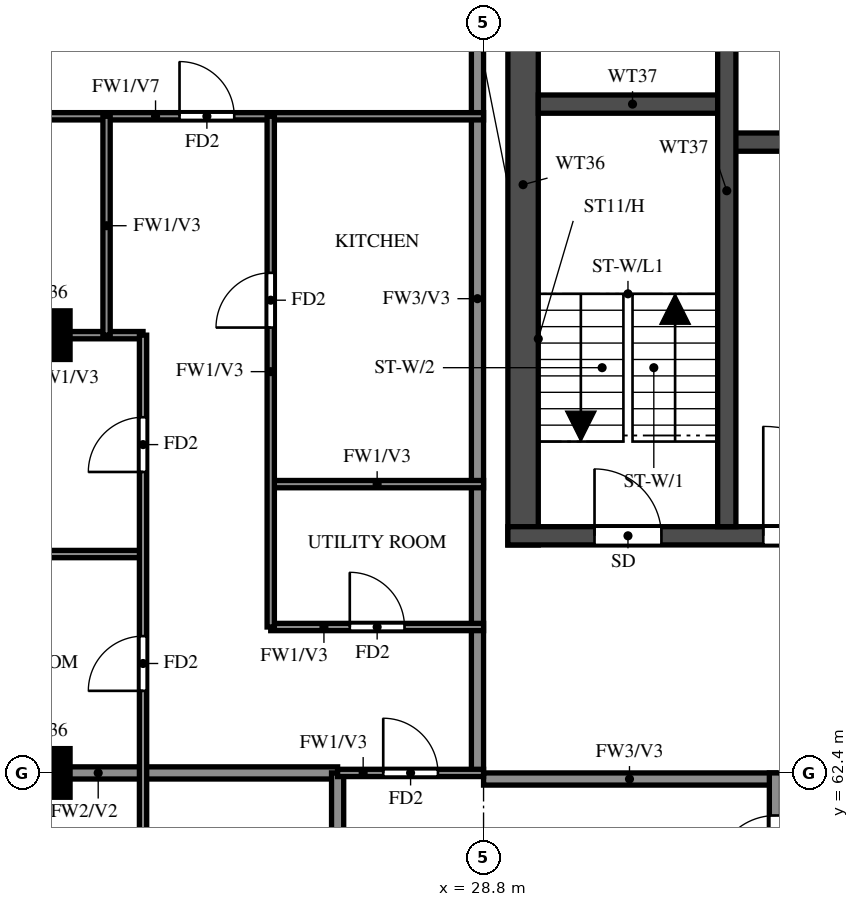
"""IFC4 building model, lengths in metres.
Left out: names, types, materials, properties, quantities, classifications, styles, units other than length and angle.
Written with IfcOpenShell. Run it as: python <this file> out.ifc"""

import sys

from ifc_helpers import new_model, si_unit, direction, frame, frame_2d, origin, origin_2d, place, context, subcontext, project, spatial, rectangle, extrude, source, transform, mapped, element, fill, save


model = new_model("IFC4")
c1 = context("Model", 3, precision=1e-05, world=origin(), true_north=direction((0.0, 1.0)))
c2 = subcontext(c1, "Body", "Model", "MODEL_VIEW")
j1 = project(units=[si_unit("LENGTHUNIT", "METRE"), si_unit("PLANEANGLEUNIT", "RADIAN")], contexts=[c1])
p1 = place(None, origin())
s1 = spatial("IfcSite", under=j1, at=p1, CompositionType="ELEMENT")
p2 = place(p1, origin())
s2 = spatial("IfcBuilding", under=s1, at=p2, CompositionType="ELEMENT")
p3 = place(p2, frame((0.0, 0.0, 250.0)))
s3 = spatial("IfcBuildingStorey", under=s2, at=p3, CompositionType="ELEMENT", Elevation=250.0)
m1 = source(origin(), c2, "Body", "SweptSolid", [
    extrude(rectangle(XDim=0.8, YDim=0.8, at=origin_2d()), origin(), (0.0, 0.0, 1.0), 3.22),
])
for number, where, z_axis, x_axis in (
    (1, (21.6, 62.4, 0.0), (0.0, 0.0, 1.0), (1.0, 0.0, 0.0)),
    (2, (21.6, 69.6, 0.0), (0.0, 0.0, 1.0), (1.0, 0.0, 0.0)),
):
    element("IfcColumn", number, at=place(p3, frame(where, z_axis=z_axis, x_axis=x_axis)), inside=s3, PredefinedType="COLUMN", context=c2, shape_type="MappedRepresentation", body=[
        mapped(m1, transform((0.0, 0.0, 0.0))),
    ])
p4 = place(p3, frame((29.45, 66.15, 0.0), z_axis=(0.0, 0.0, 1.0), x_axis=(0.0, 1.0, 0.0)))
e3 = element("IfcWall", 3, at=p4, inside=s3, PredefinedType="SHEAR", context=c2, shape_type="SweptSolid", body=[
    extrude(rectangle(XDim=11.85, YDim=0.5, at=frame_2d((5.925, 0.0))), origin(), (0.0, 0.0, 1.0), 3.22),
])
p5 = place(p3, frame((29.2, 66.3, 0.0), z_axis=(0.0, 0.0, 1.0), x_axis=(1.0, 0.0, 0.0)))
e4 = element("IfcWall", 4, at=p5, inside=s3, PredefinedType="SHEAR", context=c2, shape_type="SweptSolid", body=[
    extrude(rectangle(XDim=42.4, YDim=0.3, at=frame_2d((21.2, 0.0))), origin(), (0.0, 0.0, 1.0), 3.22),
])
p6 = place(p5, frame((1.425, 0.0, 0.0)))
e5 = element("IfcOpeningElement", 5, at=p6, cuts=e4, PredefinedType="OPENING", context=c2, shape_type="SweptSolid", body=[
    extrude(rectangle(XDim=1.1, YDim=2.1, at=frame_2d((0.55, 1.05))), frame((0.0, 0.16, 0.0), z_axis=(0.0, -1.0, 0.0), x_axis=(1.0, 0.0, 0.0)), (0.0, 0.0, 1.0), 0.32),
])
p7 = place(p5, frame((4.2, 0.0, 0.0)))
e6 = element("IfcOpeningElement", 6, at=p7, cuts=e4, PredefinedType="OPENING", context=c2, shape_type="SweptSolid", body=[
    extrude(rectangle(XDim=1.8, YDim=2.1, at=frame_2d((0.9, 1.05))), frame((0.0, 0.16, 0.0), z_axis=(0.0, -1.0, 0.0), x_axis=(1.0, 0.0, 0.0)), (0.0, 0.0, 1.0), 0.32),
])
p8 = place(p3, frame((32.8, 72.775, 0.0), z_axis=(0.0, 0.0, 1.0), x_axis=(1.0, 0.0, 0.0)))
e7 = element("IfcWall", 7, at=p8, inside=s3, PredefinedType="SHEAR", context=c2, shape_type="SweptSolid", body=[
    extrude(rectangle(XDim=35.2, YDim=0.3, at=frame_2d((17.6, 0.0))), origin(), (0.0, 0.0, 1.0), 3.22),
])
p9 = place(p8, frame((19.8, 0.0, 0.0)))
e8 = element("IfcOpeningElement", 8, at=p9, cuts=e7, PredefinedType="OPENING", context=c2, shape_type="SweptSolid", body=[
    extrude(rectangle(XDim=1.1, YDim=2.1, at=frame_2d((0.55, 1.05))), frame((0.0, 0.16, 0.0), z_axis=(0.0, -1.0, 0.0), x_axis=(1.0, 0.0, 0.0)), (0.0, 0.0, 1.0), 0.32),
])
p10 = place(p8, frame((27.725, 0.0, 0.0)))
e9 = element("IfcOpeningElement", 9, at=p10, cuts=e7, PredefinedType="OPENING", context=c2, shape_type="SweptSolid", body=[
    extrude(rectangle(XDim=1.1, YDim=2.1, at=frame_2d((0.55, 1.05))), frame((0.0, 0.16, 0.0), z_axis=(0.0, -1.0, 0.0), x_axis=(1.0, 0.0, 0.0)), (0.0, 0.0, 1.0), 0.32),
])
p11 = place(p8, frame((30.325, 0.0, 0.0)))
e10 = element("IfcOpeningElement", 10, at=p11, cuts=e7, PredefinedType="OPENING", context=c2, shape_type="SweptSolid", body=[
    extrude(rectangle(XDim=1.1, YDim=2.1, at=frame_2d((0.55, 1.05))), frame((0.0, 0.16, 0.0), z_axis=(0.0, -1.0, 0.0), x_axis=(1.0, 0.0, 0.0)), (0.0, 0.0, 1.0), 0.32),
])
p12 = place(p8, frame((3.825, 0.0, 0.0)))
e11 = element("IfcOpeningElement", 11, at=p12, cuts=e7, PredefinedType="OPENING", context=c2, shape_type="SweptSolid", body=[
    extrude(rectangle(XDim=1.1, YDim=2.1, at=frame_2d((0.55, 1.05))), frame((0.0, 0.16, 0.0), z_axis=(0.0, -1.0, 0.0), x_axis=(1.0, 0.0, 0.0)), (0.0, 0.0, 1.0), 0.32),
])
p13 = place(p8, frame((6.575, 0.0, 0.0)))
e12 = element("IfcOpeningElement", 12, at=p13, cuts=e7, PredefinedType="OPENING", context=c2, shape_type="SweptSolid", body=[
    extrude(rectangle(XDim=1.1, YDim=2.1, at=frame_2d((0.55, 1.05))), frame((0.0, 0.16, 0.0), z_axis=(0.0, -1.0, 0.0), x_axis=(1.0, 0.0, 0.0)), (0.0, 0.0, 1.0), 0.32),
])
p14 = place(p8, frame((9.325, 0.0, 0.0)))
e13 = element("IfcOpeningElement", 13, at=p14, cuts=e7, PredefinedType="OPENING", context=c2, shape_type="SweptSolid", body=[
    extrude(rectangle(XDim=1.1, YDim=2.1, at=frame_2d((0.55, 1.05))), frame((0.0, 0.16, 0.0), z_axis=(0.0, -1.0, 0.0), x_axis=(1.0, 0.0, 0.0)), (0.0, 0.0, 1.0), 0.32),
])
p15 = place(p8, frame((12.075, 0.0, 0.0)))
e14 = element("IfcOpeningElement", 14, at=p15, cuts=e7, PredefinedType="OPENING", context=c2, shape_type="SweptSolid", body=[
    extrude(rectangle(XDim=1.1, YDim=2.1, at=frame_2d((0.55, 1.05))), frame((0.0, 0.16, 0.0), z_axis=(0.0, -1.0, 0.0), x_axis=(1.0, 0.0, 0.0)), (0.0, 0.0, 1.0), 0.32),
])
p16 = place(p8, frame((14.825, 0.0, 0.0)))
e15 = element("IfcOpeningElement", 15, at=p16, cuts=e7, PredefinedType="OPENING", context=c2, shape_type="SweptSolid", body=[
    extrude(rectangle(XDim=1.1, YDim=2.1, at=frame_2d((0.55, 1.05))), frame((0.0, 0.16, 0.0), z_axis=(0.0, -1.0, 0.0), x_axis=(1.0, 0.0, 0.0)), (0.0, 0.0, 1.0), 0.32),
])
p17 = place(p8, frame((17.575, 0.0, 0.0)))
e16 = element("IfcOpeningElement", 16, at=p17, cuts=e7, PredefinedType="OPENING", context=c2, shape_type="SweptSolid", body=[
    extrude(rectangle(XDim=1.1, YDim=2.1, at=frame_2d((0.55, 1.05))), frame((0.0, 0.16, 0.0), z_axis=(0.0, -1.0, 0.0), x_axis=(1.0, 0.0, 0.0)), (0.0, 0.0, 1.0), 0.32),
])
p18 = place(p8, frame((0.95, 0.0, 0.0)))
e17 = element("IfcOpeningElement", 17, at=p18, cuts=e7, PredefinedType="OPENING", context=c2, shape_type="SweptSolid", body=[
    extrude(rectangle(XDim=1.1, YDim=2.1, at=frame_2d((0.55, 1.05))), frame((0.0, 0.16, 0.0), z_axis=(0.0, -1.0, 0.0), x_axis=(1.0, 0.0, 0.0)), (0.0, 0.0, 1.0), 0.32),
])
p19 = place(p3, frame((29.7, 73.4, 0.0), z_axis=(0.0, 0.0, 1.0), x_axis=(1.0, 0.0, 0.0)))
e18 = element("IfcWall", 18, at=p19, inside=s3, PredefinedType="SHEAR", context=c2, shape_type="SweptSolid", body=[
    extrude(rectangle(XDim=3.1, YDim=0.3, at=frame_2d((1.55, 0.0))), origin(), (0.0, 0.0, 1.0), 3.22),
])
p20 = place(p3, frame((32.8, 66.45, 0.0), z_axis=(0.0, 0.0, 1.0), x_axis=(0.0, 1.0, 0.0)))
e19 = element("IfcWall", 19, at=p20, inside=s3, PredefinedType="SHEAR", context=c2, shape_type="SweptSolid", body=[
    extrude(rectangle(XDim=11.05, YDim=0.3, at=frame_2d((5.525, 0.0))), origin(), (0.0, 0.0, 1.0), 3.22),
])
p21 = place(p3, frame((28.8, 62.3, 0.0), z_axis=(0.0, 0.0, 1.0), x_axis=(1.0, 0.0, 0.0)))
e20 = element("IfcWall", 20, at=p21, inside=s3, PredefinedType="SOLIDWALL", context=c2, shape_type="SweptSolid", body=[
    extrude(rectangle(XDim=4.8, YDim=0.2, at=frame_2d((2.4, 0.0))), origin(), (0.0, 0.0, 1.0), 3.22),
])
p22 = place(p3, frame((28.7, 62.4, 0.0), z_axis=(0.0, 0.0, 1.0), x_axis=(0.0, 1.0, 0.0)))
e21 = element("IfcWall", 21, at=p22, inside=s3, PredefinedType="SOLIDWALL", context=c2, shape_type="SweptSolid", body=[
    extrude(rectangle(XDim=15.6, YDim=0.2, at=frame_2d((7.8, 0.0))), origin(), (0.0, 0.0, 1.0), 3.22),
])
p23 = place(p3, frame((33.6, 45.6, 0.0), z_axis=(0.0, 0.0, 1.0), x_axis=(0.0, 1.0, 0.0)))
e22 = element("IfcWall", 22, at=p23, inside=s3, PredefinedType="SOLIDWALL", context=c2, shape_type="SweptSolid", body=[
    extrude(rectangle(XDim=16.8, YDim=0.2, at=frame_2d((8.4, 0.0))), origin(), (0.0, 0.0, 1.0), 3.22),
])
p24 = place(p23, frame((0.7, 0.0, 0.0)))
e23 = element("IfcOpeningElement", 23, at=p24, cuts=e22, PredefinedType="OPENING", context=c2, shape_type="SweptSolid", body=[
    extrude(rectangle(XDim=1.0, YDim=2.1, at=frame_2d((0.5, 1.05))), frame((0.0, 0.11, 0.0), z_axis=(0.0, -1.0, 0.0), x_axis=(1.0, 0.0, 0.0)), (0.0, 0.0, 1.0), 0.22),
])
p25 = place(p23, frame((8.3, 0.0, 0.0)))
e24 = element("IfcOpeningElement", 24, at=p25, cuts=e22, PredefinedType="OPENING", context=c2, shape_type="SweptSolid", body=[
    extrude(rectangle(XDim=1.0, YDim=2.1, at=frame_2d((0.5, 1.05))), frame((0.0, 0.11, 0.0), z_axis=(0.0, -1.0, 0.0), x_axis=(1.0, 0.0, 0.0)), (0.0, 0.0, 1.0), 0.22),
])
p26 = place(p23, frame((15.1, 0.0, 0.0)))
e25 = element("IfcOpeningElement", 25, at=p26, cuts=e22, PredefinedType="OPENING", context=c2, shape_type="SweptSolid", body=[
    extrude(rectangle(XDim=1.0, YDim=2.1, at=frame_2d((0.5, 1.05))), frame((0.0, 0.11, 0.0), z_axis=(0.0, -1.0, 0.0), x_axis=(1.0, 0.0, 0.0)), (0.0, 0.0, 1.0), 0.22),
])
p27 = place(p3, frame((18.525, 62.4, 0.0), z_axis=(0.0, 0.0, 1.0), x_axis=(1.0, 0.0, 0.0)))
e26 = element("IfcWall", 26, at=p27, inside=s3, PredefinedType="SOLIDWALL", context=c2, shape_type="SweptSolid", body=[
    extrude(rectangle(XDim=7.875, YDim=0.2, at=frame_2d((3.938, 0.0))), origin(), (0.0, 0.0, 1.0), 3.22),
])
p28 = place(p3, frame((26.4, 60.0, 0.0), z_axis=(0.0, 0.0, 1.0), x_axis=(0.0, 1.0, 0.0)))
e27 = element("IfcWall", 27, at=p28, inside=s3, PredefinedType="SOLIDWALL", context=c2, shape_type="SweptSolid", body=[
    extrude(rectangle(XDim=2.4, YDim=0.2, at=frame_2d((1.2, 0.0))), origin(), (0.0, 0.0, 1.0), 3.22),
])
p29 = place(p3, frame((26.4, 62.4, 0.0), z_axis=(0.0, 0.0, 1.0), x_axis=(1.0, 0.0, 0.0)))
e28 = element("IfcWall", 28, at=p29, inside=s3, PredefinedType="PARTITIONING", context=c2, shape_type="SweptSolid", body=[
    extrude(rectangle(XDim=2.4, YDim=0.12, at=frame_2d((1.2, 0.0))), origin(), (0.0, 0.0, 1.0), 3.22),
])
p30 = place(p29, frame((0.75, 0.0, 0.0)))
e29 = element("IfcOpeningElement", 29, at=p30, cuts=e28, PredefinedType="OPENING", context=c2, shape_type="SweptSolid", body=[
    extrude(rectangle(XDim=0.9, YDim=2.1, at=frame_2d((0.45, 1.05))), frame((0.0, 0.07, 0.0), z_axis=(0.0, -1.0, 0.0), x_axis=(1.0, 0.0, 0.0)), (0.0, 0.0, 1.0), 0.14),
])
p31 = place(p3, frame((25.3, 64.8, 0.0), z_axis=(0.0, 0.0, 1.0), x_axis=(1.0, 0.0, 0.0)))
e30 = element("IfcWall", 30, at=p31, inside=s3, PredefinedType="PARTITIONING", context=c2, shape_type="SweptSolid", body=[
    extrude(rectangle(XDim=3.5, YDim=0.12, at=frame_2d((1.75, 0.0))), origin(), (0.0, 0.0, 1.0), 3.22),
])
p32 = place(p31, frame((1.3, 0.0, 0.0)))
e31 = element("IfcOpeningElement", 31, at=p32, cuts=e30, PredefinedType="OPENING", context=c2, shape_type="SweptSolid", body=[
    extrude(rectangle(XDim=0.9, YDim=2.1, at=frame_2d((0.45, 1.05))), frame((0.0, 0.07, 0.0), z_axis=(0.0, -1.0, 0.0), x_axis=(1.0, 0.0, 0.0)), (0.0, 0.0, 1.0), 0.14),
])
p33 = place(p3, frame((18.525, 66.0, 0.0), z_axis=(0.0, 0.0, 1.0), x_axis=(1.0, 0.0, 0.0)))
e32 = element("IfcWall", 32, at=p33, inside=s3, PredefinedType="PARTITIONING", context=c2, shape_type="SweptSolid", body=[
    extrude(rectangle(XDim=4.675, YDim=0.12, at=frame_2d((2.337, 0.0))), origin(), (0.0, 0.0, 1.0), 2.32),
])
p34 = place(p3, frame((25.3, 67.15, 0.0), z_axis=(0.0, 0.0, 1.0), x_axis=(1.0, 0.0, 0.0)))
e33 = element("IfcWall", 33, at=p34, inside=s3, PredefinedType="PARTITIONING", context=c2, shape_type="SweptSolid", body=[
    extrude(rectangle(XDim=3.5, YDim=0.12, at=frame_2d((1.75, 0.0))), origin(), (0.0, 0.0, 1.0), 3.22),
])
p35 = place(p3, frame((18.525, 69.6, 0.0), z_axis=(0.0, 0.0, 1.0), x_axis=(1.0, 0.0, 0.0)))
e34 = element("IfcWall", 34, at=p35, inside=s3, PredefinedType="PARTITIONING", context=c2, shape_type="SweptSolid", body=[
    extrude(rectangle(XDim=4.675, YDim=0.12, at=frame_2d((2.337, 0.0))), origin(), (0.0, 0.0, 1.0), 3.22),
])
p36 = place(p35, frame((1.538, 0.0, 0.0)))
e35 = element("IfcOpeningElement", 35, at=p36, cuts=e34, PredefinedType="OPENING", context=c2, shape_type="SweptSolid", body=[
    extrude(rectangle(XDim=0.8, YDim=2.1, at=frame_2d((0.4, 1.05))), frame((0.0, 0.07, 0.0), z_axis=(0.0, -1.0, 0.0), x_axis=(1.0, 0.0, 0.0)), (0.0, 0.0, 1.0), 0.14),
])
p37 = place(p3, frame((18.525, 73.2, 0.0), z_axis=(0.0, 0.0, 1.0), x_axis=(1.0, 0.0, 0.0)))
e36 = element("IfcWall", 36, at=p37, inside=s3, PredefinedType="PARTITIONING", context=c2, shape_type="SweptSolid", body=[
    extrude(rectangle(XDim=10.275, YDim=0.12, at=frame_2d((5.138, 0.0))), origin(), (0.0, 0.0, 1.0), 2.32),
])
p38 = place(p37, frame((5.275, 0.0, 0.0)))
e37 = element("IfcOpeningElement", 37, at=p38, cuts=e36, PredefinedType="OPENING", context=c2, shape_type="SweptSolid", body=[
    extrude(rectangle(XDim=0.9, YDim=2.1, at=frame_2d((0.45, 1.05))), frame((0.0, 0.07, 0.0), z_axis=(0.0, -1.0, 0.0), x_axis=(1.0, 0.0, 0.0)), (0.0, 0.0, 1.0), 0.14),
])
p39 = place(p3, frame((22.6, 69.6, 0.0), z_axis=(0.0, 0.0, 1.0), x_axis=(0.0, 1.0, 0.0)))
e38 = element("IfcWall", 38, at=p39, inside=s3, PredefinedType="PARTITIONING", context=c2, shape_type="SweptSolid", body=[
    extrude(rectangle(XDim=3.6, YDim=0.12, at=frame_2d((1.8, 0.0))), origin(), (0.0, 0.0, 1.0), 3.22),
])
p40 = place(p3, frame((23.2, 48.0, 0.0), z_axis=(0.0, 0.0, 1.0), x_axis=(0.0, 1.0, 0.0)))
e39 = element("IfcWall", 39, at=p40, inside=s3, PredefinedType="PARTITIONING", context=c2, shape_type="SweptSolid", body=[
    extrude(rectangle(XDim=21.6, YDim=0.12, at=frame_2d((10.8, 0.0))), origin(), (0.0, 0.0, 1.0), 3.22),
])
p41 = place(p40, frame((1.35, 0.0, 0.0)))
e40 = element("IfcOpeningElement", 40, at=p41, cuts=e39, PredefinedType="OPENING", context=c2, shape_type="SweptSolid", body=[
    extrude(rectangle(XDim=0.9, YDim=2.1, at=frame_2d((0.45, 1.05))), frame((0.0, 0.07, 0.0), z_axis=(0.0, -1.0, 0.0), x_axis=(1.0, 0.0, 0.0)), (0.0, 0.0, 1.0), 0.14),
])
p42 = place(p40, frame((7.95, 0.0, 0.0)))
e41 = element("IfcOpeningElement", 41, at=p42, cuts=e39, PredefinedType="OPENING", context=c2, shape_type="SweptSolid", body=[
    extrude(rectangle(XDim=1.5, YDim=2.1, at=frame_2d((0.75, 1.05))), frame((0.0, 0.07, 0.0), z_axis=(0.0, -1.0, 0.0), x_axis=(1.0, 0.0, 0.0)), (0.0, 0.0, 1.0), 0.14),
])
p43 = place(p40, frame((12.15, 0.0, 0.0)))
e42 = element("IfcOpeningElement", 42, at=p43, cuts=e39, PredefinedType="OPENING", context=c2, shape_type="SweptSolid", body=[
    extrude(rectangle(XDim=0.9, YDim=2.1, at=frame_2d((0.45, 1.05))), frame((0.0, 0.07, 0.0), z_axis=(0.0, -1.0, 0.0), x_axis=(1.0, 0.0, 0.0)), (0.0, 0.0, 1.0), 0.14),
])
p44 = place(p40, frame((15.75, 0.0, 0.0)))
e43 = element("IfcOpeningElement", 43, at=p44, cuts=e39, PredefinedType="OPENING", context=c2, shape_type="SweptSolid", body=[
    extrude(rectangle(XDim=0.9, YDim=2.1, at=frame_2d((0.45, 1.05))), frame((0.0, 0.07, 0.0), z_axis=(0.0, -1.0, 0.0), x_axis=(1.0, 0.0, 0.0)), (0.0, 0.0, 1.0), 0.14),
])
p45 = place(p40, frame((19.35, 0.0, 0.0)))
e44 = element("IfcOpeningElement", 44, at=p45, cuts=e39, PredefinedType="OPENING", context=c2, shape_type="SweptSolid", body=[
    extrude(rectangle(XDim=0.9, YDim=2.1, at=frame_2d((0.45, 1.05))), frame((0.0, 0.07, 0.0), z_axis=(0.0, -1.0, 0.0), x_axis=(1.0, 0.0, 0.0)), (0.0, 0.0, 1.0), 0.14),
])
p46 = place(p3, frame((25.3, 64.8, 0.0), z_axis=(0.0, 0.0, 1.0), x_axis=(0.0, 1.0, 0.0)))
e45 = element("IfcWall", 45, at=p46, inside=s3, PredefinedType="PARTITIONING", context=c2, shape_type="SweptSolid", body=[
    extrude(rectangle(XDim=8.4, YDim=0.12, at=frame_2d((4.2, 0.0))), origin(), (0.0, 0.0, 1.0), 3.22),
])
p47 = place(p46, frame((4.925, 0.0, 0.0)))
e46 = element("IfcOpeningElement", 46, at=p47, cuts=e45, PredefinedType="OPENING", context=c2, shape_type="SweptSolid", body=[
    extrude(rectangle(XDim=0.9, YDim=2.1, at=frame_2d((0.45, 1.05))), frame((0.0, 0.07, 0.0), z_axis=(0.0, -1.0, 0.0), x_axis=(1.0, 0.0, 0.0)), (0.0, 0.0, 1.0), 0.14),
])
p48 = place(p6, origin())
e47 = element("IfcDoor", 47, at=p48, inside=s3, OperationType="SINGLE_SWING_LEFT", PredefinedType="DOOR", context=c2, shape_type="SweptSolid", body=[
    extrude(rectangle(XDim=1.1, YDim=2.1, at=frame_2d((0.55, 1.05))), frame((0.0, 0.025, 0.0), z_axis=(0.0, -1.0, 0.0), x_axis=(1.0, 0.0, 0.0)), (0.0, 0.0, 1.0), 0.05),
])
fill(e5, e47)
p49 = place(p7, origin())
e48 = element("IfcDoor", 48, at=p49, inside=s3, OperationType="DOUBLE_DOOR_SINGLE_SWING", PredefinedType="DOOR", context=c2, shape_type="SweptSolid", body=[
    extrude(rectangle(XDim=1.8, YDim=2.1, at=frame_2d((0.9, 1.05))), frame((0.0, 0.025, 0.0), z_axis=(0.0, -1.0, 0.0), x_axis=(1.0, 0.0, 0.0)), (0.0, 0.0, 1.0), 0.05),
])
fill(e6, e48)
p50 = place(p30, origin())
e49 = element("IfcDoor", 49, at=p50, inside=s3, OperationType="SINGLE_SWING_LEFT", PredefinedType="DOOR", context=c2, shape_type="SweptSolid", body=[
    extrude(rectangle(XDim=0.9, YDim=2.1, at=frame_2d((0.45, 1.05))), frame((0.0, 0.025, 0.0), z_axis=(0.0, -1.0, 0.0), x_axis=(1.0, 0.0, 0.0)), (0.0, 0.0, 1.0), 0.05),
])
fill(e29, e49)
p51 = place(p26, origin())
e50 = element("IfcDoor", 50, at=p51, inside=s3, OperationType="SINGLE_SWING_RIGHT", PredefinedType="DOOR", context=c2, shape_type="SweptSolid", body=[
    extrude(rectangle(XDim=1.0, YDim=2.1, at=frame_2d((0.5, 1.05))), frame((0.0, 0.025, 0.0), z_axis=(0.0, -1.0, 0.0), x_axis=(1.0, 0.0, 0.0)), (0.0, 0.0, 1.0), 0.05),
])
fill(e25, e50)
p52 = place(p44, origin())
e51 = element("IfcDoor", 51, at=p52, inside=s3, OperationType="SINGLE_SWING_LEFT", PredefinedType="DOOR", context=c2, shape_type="SweptSolid", body=[
    extrude(rectangle(XDim=0.9, YDim=2.1, at=frame_2d((0.45, 1.05))), frame((0.0, 0.025, 0.0), z_axis=(0.0, -1.0, 0.0), x_axis=(1.0, 0.0, 0.0)), (0.0, 0.0, 1.0), 0.05),
])
fill(e43, e51)
p53 = place(p45, origin())
e52 = element("IfcDoor", 52, at=p53, inside=s3, OperationType="SINGLE_SWING_LEFT", PredefinedType="DOOR", context=c2, shape_type="SweptSolid", body=[
    extrude(rectangle(XDim=0.9, YDim=2.1, at=frame_2d((0.45, 1.05))), frame((0.0, 0.025, 0.0), z_axis=(0.0, -1.0, 0.0), x_axis=(1.0, 0.0, 0.0)), (0.0, 0.0, 1.0), 0.05),
])
fill(e44, e52)
p54 = place(p38, origin())
e53 = element("IfcDoor", 53, at=p54, inside=s3, OperationType="SINGLE_SWING_LEFT", PredefinedType="DOOR", context=c2, shape_type="SweptSolid", body=[
    extrude(rectangle(XDim=0.9, YDim=2.1, at=frame_2d((0.45, 1.05))), frame((0.0, 0.025, 0.0), z_axis=(0.0, -1.0, 0.0), x_axis=(1.0, 0.0, 0.0)), (0.0, 0.0, 1.0), 0.05),
])
fill(e37, e53)
p55 = place(p32, origin())
e54 = element("IfcDoor", 54, at=p55, inside=s3, OperationType="SINGLE_SWING_LEFT", PredefinedType="DOOR", context=c2, shape_type="SweptSolid", body=[
    extrude(rectangle(XDim=0.9, YDim=2.1, at=frame_2d((0.45, 1.05))), frame((0.0, 0.025, 0.0), z_axis=(0.0, -1.0, 0.0), x_axis=(1.0, 0.0, 0.0)), (0.0, 0.0, 1.0), 0.05),
])
fill(e31, e54)
p56 = place(p47, origin())
e55 = element("IfcDoor", 55, at=p56, inside=s3, OperationType="SINGLE_SWING_RIGHT", PredefinedType="DOOR", context=c2, shape_type="SweptSolid", body=[
    extrude(rectangle(XDim=0.9, YDim=2.1, at=frame_2d((0.45, 1.05))), frame((0.0, 0.025, 0.0), z_axis=(0.0, -1.0, 0.0), x_axis=(1.0, 0.0, 0.0)), (0.0, 0.0, 1.0), 0.05),
])
fill(e46, e55)
save(model, sys.argv[1])
